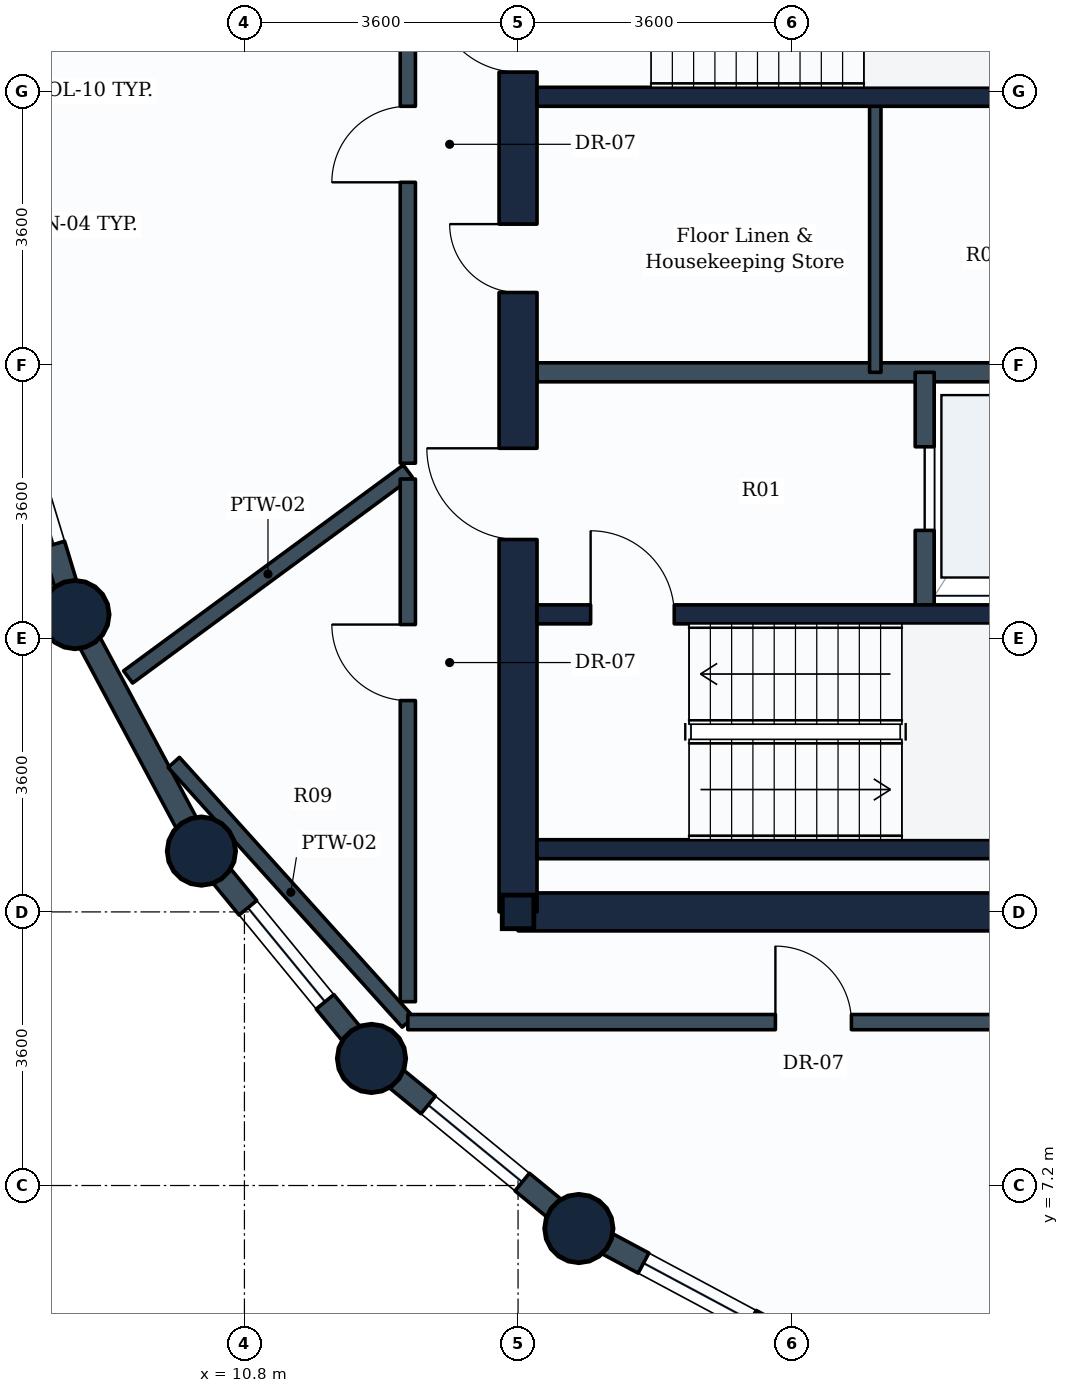
"""IFC4 building model, lengths in metres.
Left out: names, types, materials, properties, quantities, classifications, styles, units other than length and angle.
Written with IfcOpenShell. Run it as: python <this file> out.ifc"""

import sys

from ifc_helpers import new_model, si_unit, direction, frame, frame_2d, origin, origin_2d, place, context, subcontext, project, spatial, rectangle, circle, i_section, extrude, element, fill, save


model = new_model("IFC4")
c1 = context("Model", 3, precision=1e-05, world=origin(), true_north=direction((0.0, 1.0)))
c2 = subcontext(c1, "Body", "Model", "MODEL_VIEW")
j1 = project(units=[si_unit("LENGTHUNIT", "METRE"), si_unit("PLANEANGLEUNIT", "RADIAN")], contexts=[c1])
p1 = place(None, origin())
s1 = spatial("IfcSite", under=j1, at=p1, CompositionType="ELEMENT")
p2 = place(p1, origin())
s2 = spatial("IfcBuilding", under=s1, at=p2, CompositionType="ELEMENT")
p3 = place(p2, frame((0.0, 0.0, 139.0)))
s3 = spatial("IfcBuildingStorey", under=s2, at=p3, CompositionType="ELEMENT", Elevation=139.0)
for number, where, z_axis, x_axis in (
    (1, (8.57, 14.712, 0.0), (0.0, 0.0, 1.0), (1.0, 0.0, 0.0)),
    (2, (10.234, 11.6, 0.0), (0.0, 0.0, 1.0), (1.0, 0.0, 0.0)),
    (3, (12.472, 8.872, 0.0), (0.0, 0.0, 1.0), (1.0, 0.0, 0.0)),
):
    element("IfcColumn", number, at=place(p3, frame(where, z_axis=z_axis, x_axis=x_axis)), inside=s3, PredefinedType="COLUMN", context=c2, shape_type="SweptSolid", body=[
        extrude(circle(Radius=0.45, at=origin_2d()), origin(), (0.0, 0.0, 1.0), 3.8),
    ])
p4 = place(p3, frame((14.4, 10.8, 0.0), z_axis=(0.0, 0.0, 1.0), x_axis=(1.0, 0.0, 0.0)))
e4 = element("IfcColumn", 4, at=p4, inside=s3, PredefinedType="COLUMN", context=c2, shape_type="SweptSolid", body=[
    extrude(i_section(OverallWidth=0.416, OverallDepth=0.442, WebThickness=0.025, FlangeThickness=0.041, FilletRadius=0.015, at=origin_2d()), origin(), (0.0, 0.0, 1.0), 3.8),
])
p5 = place(p3, frame((15.2, 6.634, 0.0), z_axis=(0.0, 0.0, 1.0), x_axis=(1.0, 0.0, 0.0)))
e5 = element("IfcColumn", 5, at=p5, inside=s3, PredefinedType="COLUMN", context=c2, shape_type="SweptSolid", body=[
    extrude(circle(Radius=0.45, at=origin_2d()), origin(), (0.0, 0.0, 1.0), 3.8),
])
p6 = place(p3, frame((8.57, 14.712, 0.0), z_axis=(0.0, 0.0, 1.0), x_axis=(-0.290305086481, 0.956934144423, 0.0)))
e6 = element("IfcWall", 6, at=p6, inside=s3, PredefinedType="STANDARD", context=c2, shape_type="SweptSolid", body=[
    extrude(rectangle(XDim=3.528, YDim=0.3, at=frame_2d((1.764, 0.0))), origin(), (0.0, 0.0, 1.0), 2.93),
])
p7 = place(p6, frame((0.964, 0.0, 0.85)))
e7 = element("IfcOpeningElement", 7, at=p7, cuts=e6, PredefinedType="OPENING", context=c2, shape_type="SweptSolid", body=[
    extrude(rectangle(XDim=1.6, YDim=1.35, at=frame_2d((0.8, 0.675))), frame((0.0, 0.16, 0.0), z_axis=(0.0, -1.0, 0.0), x_axis=(1.0, 0.0, 0.0)), (0.0, 0.0, 1.0), 0.32),
])
p8 = place(p3, frame((10.234, 11.6, 0.0), z_axis=(0.0, 0.0, 1.0), x_axis=(-0.47151087309, 0.881860247748, 0.0)))
e8 = element("IfcWall", 8, at=p8, inside=s3, PredefinedType="STANDARD", context=c2, shape_type="SweptSolid", body=[
    extrude(rectangle(XDim=3.529, YDim=0.3, at=frame_2d((1.764, 0.0))), origin(), (0.0, 0.0, 1.0), 2.93),
])
p9 = place(p3, frame((12.472, 8.872, 0.0), z_axis=(0.0, 0.0, 1.0), x_axis=(-0.634258295121, 0.773121216285, 0.0)))
e9 = element("IfcWall", 9, at=p9, inside=s3, PredefinedType="STANDARD", context=c2, shape_type="SweptSolid", body=[
    extrude(rectangle(XDim=3.529, YDim=0.3, at=frame_2d((1.764, 0.0))), origin(), (0.0, 0.0, 1.0), 2.93),
])
p10 = place(p9, frame((0.964, 0.0, 0.85)))
e10 = element("IfcOpeningElement", 10, at=p10, cuts=e9, PredefinedType="OPENING", context=c2, shape_type="SweptSolid", body=[
    extrude(rectangle(XDim=1.6, YDim=1.35, at=frame_2d((0.8, 0.675))), frame((0.0, 0.16, 0.0), z_axis=(0.0, -1.0, 0.0), x_axis=(1.0, 0.0, 0.0)), (0.0, 0.0, 1.0), 0.32),
])
p11 = place(p3, frame((15.2, 6.634, 0.0), z_axis=(0.0, 0.0, 1.0), x_axis=(-0.773121216285, 0.634258295121, 0.0)))
e11 = element("IfcWall", 11, at=p11, inside=s3, PredefinedType="STANDARD", context=c2, shape_type="SweptSolid", body=[
    extrude(rectangle(XDim=3.529, YDim=0.3, at=frame_2d((1.764, 0.0))), origin(), (0.0, 0.0, 1.0), 2.93),
])
p12 = place(p11, frame((0.964, 0.0, 0.85)))
e12 = element("IfcOpeningElement", 12, at=p12, cuts=e11, PredefinedType="OPENING", context=c2, shape_type="SweptSolid", body=[
    extrude(rectangle(XDim=1.6, YDim=1.35, at=frame_2d((0.8, 0.675))), frame((0.0, 0.16, 0.0), z_axis=(0.0, -1.0, 0.0), x_axis=(1.0, 0.0, 0.0)), (0.0, 0.0, 1.0), 0.32),
])
p13 = place(p3, frame((18.312, 4.97, 0.0), z_axis=(0.0, 0.0, 1.0), x_axis=(-0.881846862014, 0.471535907389, 0.0)))
e13 = element("IfcWall", 13, at=p13, inside=s3, PredefinedType="STANDARD", context=c2, shape_type="SweptSolid", body=[
    extrude(rectangle(XDim=3.529, YDim=0.3, at=frame_2d((1.765, 0.0))), origin(), (0.0, 0.0, 1.0), 2.93),
])
p14 = place(p13, frame((0.964, 0.0, 0.85)))
e14 = element("IfcOpeningElement", 14, at=p14, cuts=e13, PredefinedType="OPENING", context=c2, shape_type="SweptSolid", body=[
    extrude(rectangle(XDim=1.6, YDim=1.35, at=frame_2d((0.8, 0.675))), frame((0.0, 0.16, 0.0), z_axis=(0.0, -1.0, 0.0), x_axis=(1.0, 0.0, 0.0)), (0.0, 0.0, 1.0), 0.32),
])
p15 = place(p3, frame((14.4, 10.8, 0.0), z_axis=(0.0, 0.0, 1.0), x_axis=(1.0, 0.0, 0.0)))
e15 = element("IfcWall", 15, at=p15, inside=s3, PredefinedType="SHEAR", context=c2, shape_type="SweptSolid", body=[
    extrude(rectangle(XDim=18.0, YDim=0.5, at=frame_2d((9.0, 0.0))), origin(), (0.0, 0.0, 1.0), 3.55),
])
p16 = place(p3, frame((14.4, 10.8, 0.0), z_axis=(0.0, 0.0, 1.0), x_axis=(0.0, 1.0, 0.0)))
e16 = element("IfcWall", 16, at=p16, inside=s3, PredefinedType="SHEAR", context=c2, shape_type="SweptSolid", body=[
    extrude(rectangle(XDim=14.4, YDim=0.5, at=frame_2d((7.2, 0.0))), origin(), (0.0, 0.0, 1.0), 3.55),
])
p17 = place(p16, frame((11.05, 0.0, 0.0)))
e17 = element("IfcOpeningElement", 17, at=p17, cuts=e16, PredefinedType="OPENING", context=c2, shape_type="SweptSolid", body=[
    extrude(rectangle(XDim=1.1, YDim=2.1, at=frame_2d((0.55, 1.05))), frame((0.0, 0.26, 0.0), z_axis=(0.0, -1.0, 0.0), x_axis=(1.0, 0.0, 0.0)), (0.0, 0.0, 1.0), 0.52),
])
p18 = place(p16, frame((4.9, 0.0, 0.0)))
e18 = element("IfcOpeningElement", 18, at=p18, cuts=e16, PredefinedType="OPENING", context=c2, shape_type="SweptSolid", body=[
    extrude(rectangle(XDim=1.2, YDim=2.1, at=frame_2d((0.6, 1.05))), frame((0.0, 0.26, 0.0), z_axis=(0.0, -1.0, 0.0), x_axis=(1.0, 0.0, 0.0)), (0.0, 0.0, 1.0), 0.52),
])
p19 = place(p16, frame((8.15, 0.0, 0.0)))
e19 = element("IfcOpeningElement", 19, at=p19, cuts=e16, PredefinedType="OPENING", context=c2, shape_type="SweptSolid", body=[
    extrude(rectangle(XDim=0.9, YDim=2.1, at=frame_2d((0.45, 1.05))), frame((0.0, 0.26, 0.0), z_axis=(0.0, -1.0, 0.0), x_axis=(1.0, 0.0, 0.0)), (0.0, 0.0, 1.0), 0.52),
])
p20 = place(p3, frame((14.65, 11.625, 0.0), z_axis=(0.0, 0.0, 1.0), x_axis=(1.0, 0.0, 0.0)))
e20 = element("IfcWall", 20, at=p20, inside=s3, PredefinedType="SHEAR", context=c2, shape_type="SweptSolid", body=[
    extrude(rectangle(XDim=8.7, YDim=0.25, at=frame_2d((4.35, 0.0))), origin(), (0.0, 0.0, 1.0), 3.55),
])
p21 = place(p3, frame((14.65, 14.715, 0.0), z_axis=(0.0, 0.0, 1.0), x_axis=(1.0, 0.0, 0.0)))
e21 = element("IfcWall", 21, at=p21, inside=s3, PredefinedType="SHEAR", context=c2, shape_type="SweptSolid", body=[
    extrude(rectangle(XDim=8.7, YDim=0.25, at=frame_2d((4.35, 0.0))), origin(), (0.0, 0.0, 1.0), 3.55),
])
p22 = place(p21, frame((0.705, 0.0, 0.0)))
e22 = element("IfcOpeningElement", 22, at=p22, cuts=e21, PredefinedType="OPENING", context=c2, shape_type="SweptSolid", body=[
    extrude(rectangle(XDim=1.1, YDim=2.1, at=frame_2d((0.55, 1.05))), frame((0.0, 0.135, 0.0), z_axis=(0.0, -1.0, 0.0), x_axis=(1.0, 0.0, 0.0)), (0.0, 0.0, 1.0), 0.27),
])
p23 = place(p3, frame((14.65, 21.525, 0.0), z_axis=(0.0, 0.0, 1.0), x_axis=(1.0, 0.0, 0.0)))
e23 = element("IfcWall", 23, at=p23, inside=s3, PredefinedType="SHEAR", context=c2, shape_type="SweptSolid", body=[
    extrude(rectangle(XDim=8.25, YDim=0.25, at=frame_2d((4.125, 0.0))), origin(), (0.0, 0.0, 1.0), 3.55),
])
p24 = place(p3, frame((14.65, 17.9, 0.0), z_axis=(0.0, 0.0, 1.0), x_axis=(1.0, 0.0, 0.0)))
e24 = element("IfcWall", 24, at=p24, inside=s3, PredefinedType="PARTITIONING", context=c2, shape_type="SweptSolid", body=[
    extrude(rectangle(XDim=7.15, YDim=0.25, at=frame_2d((3.575, 0.0))), origin(), (0.0, 0.0, 1.0), 3.535),
])
p25 = place(p3, frame((19.75, 14.84, 0.0), z_axis=(0.0, 0.0, 1.0), x_axis=(0.0, 1.0, 0.0)))
e25 = element("IfcWall", 25, at=p25, inside=s3, PredefinedType="PARTITIONING", context=c2, shape_type="SweptSolid", body=[
    extrude(rectangle(XDim=3.06, YDim=0.25, at=frame_2d((1.53, 0.0))), origin(), (0.0, 0.0, 1.0), 3.535),
])
p26 = place(p25, frame((0.98, 0.0, 0.0)))
e26 = element("IfcOpeningElement", 26, at=p26, cuts=e25, PredefinedType="OPENING", context=c2, shape_type="SweptSolid", body=[
    extrude(rectangle(XDim=1.1, YDim=2.1, at=frame_2d((0.55, 1.05))), frame((0.0, 0.135, 0.0), z_axis=(0.0, -1.0, 0.0), x_axis=(1.0, 0.0, 0.0)), (0.0, 0.0, 1.0), 0.27),
])
p27 = place(p3, frame((19.1, 17.9, 0.0), z_axis=(0.0, 0.0, 1.0), x_axis=(0.0, 1.0, 0.0)))
e27 = element("IfcWall", 27, at=p27, inside=s3, PredefinedType="PARTITIONING", context=c2, shape_type="SweptSolid", body=[
    extrude(rectangle(XDim=3.625, YDim=0.15, at=frame_2d((1.812, 0.0))), origin(), (0.0, 0.0, 1.0), 3.535),
])
p28 = place(p3, frame((12.95, 9.35, 0.0), z_axis=(0.0, 0.0, 1.0), x_axis=(-0.669422074366, 0.742882282971, 0.0)))
e28 = element("IfcWall", 28, at=p28, inside=s3, PredefinedType="PARTITIONING", context=c2, shape_type="SweptSolid", body=[
    extrude(rectangle(XDim=4.6, YDim=0.2, at=frame_2d((2.3, 0.0))), origin(), (0.0, 0.0, 1.0), 2.93),
])
p29 = place(p3, frame((12.95, 16.6, 0.0), z_axis=(0.0, 0.0, 1.0), x_axis=(-0.805365932827, -0.592777963694, 0.0)))
e29 = element("IfcWall", 29, at=p29, inside=s3, PredefinedType="PARTITIONING", context=c2, shape_type="SweptSolid", body=[
    extrude(rectangle(XDim=4.57, YDim=0.2, at=frame_2d((2.285, 0.0))), origin(), (0.0, 0.0, 1.0), 2.93),
])
p30 = place(p3, frame((12.95, 16.704, 0.0), z_axis=(0.0, 0.0, 1.0), x_axis=(0.0, 1.0, 0.0)))
e30 = element("IfcWall", 30, at=p30, inside=s3, PredefinedType="PARTITIONING", context=c2, shape_type="SweptSolid", body=[
    extrude(rectangle(XDim=8.417, YDim=0.2, at=frame_2d((4.208, 0.0))), origin(), (0.0, 0.0, 1.0), 3.18),
])
p31 = place(p30, frame((3.696, 0.0, 0.0)))
e31 = element("IfcOpeningElement", 31, at=p31, cuts=e30, PredefinedType="OPENING", context=c2, shape_type="SweptSolid", body=[
    extrude(rectangle(XDim=1.0, YDim=2.1, at=frame_2d((0.5, 1.05))), frame((0.0, 0.11, 0.0), z_axis=(0.0, -1.0, 0.0), x_axis=(1.0, 0.0, 0.0)), (0.0, 0.0, 1.0), 0.22),
])
p32 = place(p3, frame((12.95, 9.619, 0.0), z_axis=(0.0, 0.0, 1.0), x_axis=(0.0, 1.0, 0.0)))
e32 = element("IfcWall", 32, at=p32, inside=s3, PredefinedType="PARTITIONING", context=c2, shape_type="SweptSolid", body=[
    extrude(rectangle(XDim=6.877, YDim=0.2, at=frame_2d((3.438, 0.0))), origin(), (0.0, 0.0, 1.0), 3.17),
])
p33 = place(p32, frame((3.962, 0.0, 0.0)))
e33 = element("IfcOpeningElement", 33, at=p33, cuts=e32, PredefinedType="OPENING", context=c2, shape_type="SweptSolid", body=[
    extrude(rectangle(XDim=1.0, YDim=2.1, at=frame_2d((0.5, 1.05))), frame((0.0, 0.11, 0.0), z_axis=(0.0, -1.0, 0.0), x_axis=(1.0, 0.0, 0.0)), (0.0, 0.0, 1.0), 0.22),
])
p34 = place(p3, frame((12.95, 9.35, 0.0), z_axis=(0.0, 0.0, 1.0), x_axis=(1.0, 0.0, 0.0)))
e34 = element("IfcWall", 34, at=p34, inside=s3, PredefinedType="PARTITIONING", context=c2, shape_type="SweptSolid", body=[
    extrude(rectangle(XDim=15.771, YDim=0.2, at=frame_2d((7.885, 0.0))), origin(), (0.0, 0.0, 1.0), 3.17),
])
p35 = place(p34, frame((4.836, 0.0, 0.0)))
e35 = element("IfcOpeningElement", 35, at=p35, cuts=e34, PredefinedType="OPENING", context=c2, shape_type="SweptSolid", body=[
    extrude(rectangle(XDim=1.0, YDim=2.1, at=frame_2d((0.5, 1.05))), frame((0.0, 0.11, 0.0), z_axis=(0.0, -1.0, 0.0), x_axis=(1.0, 0.0, 0.0)), (0.0, 0.0, 1.0), 0.22),
])
p36 = place(p7, origin())
e36 = element("IfcWindow", 36, at=p36, inside=s3, PartitioningType="SINGLE_PANEL", PredefinedType="WINDOW", context=c2, shape_type="SweptSolid", body=[
    extrude(rectangle(XDim=1.6, YDim=1.35, at=frame_2d((0.8, 0.675))), frame((0.0, 0.03, 0.0), z_axis=(0.0, -1.0, 0.0), x_axis=(1.0, 0.0, 0.0)), (0.0, 0.0, 1.0), 0.06),
])
fill(e7, e36)
p37 = place(p10, origin())
e37 = element("IfcWindow", 37, at=p37, inside=s3, PartitioningType="SINGLE_PANEL", PredefinedType="WINDOW", context=c2, shape_type="SweptSolid", body=[
    extrude(rectangle(XDim=1.6, YDim=1.35, at=frame_2d((0.8, 0.675))), frame((0.0, 0.03, 0.0), z_axis=(0.0, -1.0, 0.0), x_axis=(1.0, 0.0, 0.0)), (0.0, 0.0, 1.0), 0.06),
])
fill(e10, e37)
p38 = place(p12, origin())
e38 = element("IfcWindow", 38, at=p38, inside=s3, PartitioningType="SINGLE_PANEL", PredefinedType="WINDOW", context=c2, shape_type="SweptSolid", body=[
    extrude(rectangle(XDim=1.6, YDim=1.35, at=frame_2d((0.8, 0.675))), frame((0.0, 0.03, 0.0), z_axis=(0.0, -1.0, 0.0), x_axis=(1.0, 0.0, 0.0)), (0.0, 0.0, 1.0), 0.06),
])
fill(e12, e38)
p39 = place(p14, origin())
e39 = element("IfcWindow", 39, at=p39, inside=s3, PartitioningType="SINGLE_PANEL", PredefinedType="WINDOW", context=c2, shape_type="SweptSolid", body=[
    extrude(rectangle(XDim=1.6, YDim=1.35, at=frame_2d((0.8, 0.675))), frame((0.0, 0.03, 0.0), z_axis=(0.0, -1.0, 0.0), x_axis=(1.0, 0.0, 0.0)), (0.0, 0.0, 1.0), 0.06),
])
fill(e14, e39)
p40 = place(p22, origin())
e40 = element("IfcDoor", 40, at=p40, inside=s3, OperationType="SINGLE_SWING_LEFT", PredefinedType="DOOR", context=c2, shape_type="SweptSolid", body=[
    extrude(rectangle(XDim=1.1, YDim=2.1, at=frame_2d((0.55, 1.05))), frame((0.0, 0.025, 0.0), z_axis=(0.0, -1.0, 0.0), x_axis=(1.0, 0.0, 0.0)), (0.0, 0.0, 1.0), 0.05),
])
fill(e22, e40)
p41 = place(p17, origin())
e41 = element("IfcDoor", 41, at=p41, inside=s3, OperationType="SINGLE_SWING_RIGHT", PredefinedType="DOOR", context=c2, shape_type="SweptSolid", body=[
    extrude(rectangle(XDim=1.1, YDim=2.1, at=frame_2d((0.55, 1.05))), frame((0.0, 0.025, 0.0), z_axis=(0.0, -1.0, 0.0), x_axis=(1.0, 0.0, 0.0)), (0.0, 0.0, 1.0), 0.05),
])
fill(e17, e41)
p42 = place(p26, origin())
e42 = element("IfcDoor", 42, at=p42, inside=s3, OperationType="SLIDING_TO_LEFT", PredefinedType="DOOR", context=c2, shape_type="SweptSolid", body=[
    extrude(rectangle(XDim=1.1, YDim=2.1, at=frame_2d((0.55, 1.05))), frame((0.0, 0.025, 0.0), z_axis=(0.0, -1.0, 0.0), x_axis=(1.0, 0.0, 0.0)), (0.0, 0.0, 1.0), 0.05),
])
fill(e26, e42)
p43 = place(p18, origin())
e43 = element("IfcDoor", 43, at=p43, inside=s3, OperationType="SINGLE_SWING_RIGHT", PredefinedType="DOOR", context=c2, shape_type="SweptSolid", body=[
    extrude(rectangle(XDim=1.2, YDim=2.1, at=frame_2d((0.6, 1.05))), frame((0.0, 0.025, 0.0), z_axis=(0.0, -1.0, 0.0), x_axis=(1.0, 0.0, 0.0)), (0.0, 0.0, 1.0), 0.05),
])
fill(e18, e43)
p44 = place(p19, origin())
e44 = element("IfcDoor", 44, at=p44, inside=s3, OperationType="SINGLE_SWING_RIGHT", PredefinedType="DOOR", context=c2, shape_type="SweptSolid", body=[
    extrude(rectangle(XDim=0.9, YDim=2.1, at=frame_2d((0.45, 1.05))), frame((0.0, 0.025, 0.0), z_axis=(0.0, -1.0, 0.0), x_axis=(1.0, 0.0, 0.0)), (0.0, 0.0, 1.0), 0.05),
])
fill(e19, e44)
p45 = place(p31, origin())
e45 = element("IfcDoor", 45, at=p45, inside=s3, OperationType="SINGLE_SWING_LEFT", PredefinedType="DOOR", context=c2, shape_type="SweptSolid", body=[
    extrude(rectangle(XDim=1.0, YDim=2.1, at=frame_2d((0.5, 1.05))), frame((0.0, 0.025, 0.0), z_axis=(0.0, -1.0, 0.0), x_axis=(1.0, 0.0, 0.0)), (0.0, 0.0, 1.0), 0.05),
])
fill(e31, e45)
p46 = place(p33, origin())
e46 = element("IfcDoor", 46, at=p46, inside=s3, OperationType="SINGLE_SWING_RIGHT", PredefinedType="DOOR", context=c2, shape_type="SweptSolid", body=[
    extrude(rectangle(XDim=1.0, YDim=2.1, at=frame_2d((0.5, 1.05))), frame((0.0, 0.025, 0.0), z_axis=(0.0, -1.0, 0.0), x_axis=(1.0, 0.0, 0.0)), (0.0, 0.0, 1.0), 0.05),
])
fill(e33, e46)
p47 = place(p35, origin())
e47 = element("IfcDoor", 47, at=p47, inside=s3, OperationType="SINGLE_SWING_LEFT", PredefinedType="DOOR", context=c2, shape_type="SweptSolid", body=[
    extrude(rectangle(XDim=1.0, YDim=2.1, at=frame_2d((0.5, 1.05))), frame((0.0, 0.025, 0.0), z_axis=(0.0, -1.0, 0.0), x_axis=(1.0, 0.0, 0.0)), (0.0, 0.0, 1.0), 0.05),
])
fill(e35, e47)
save(model, sys.argv[1])
